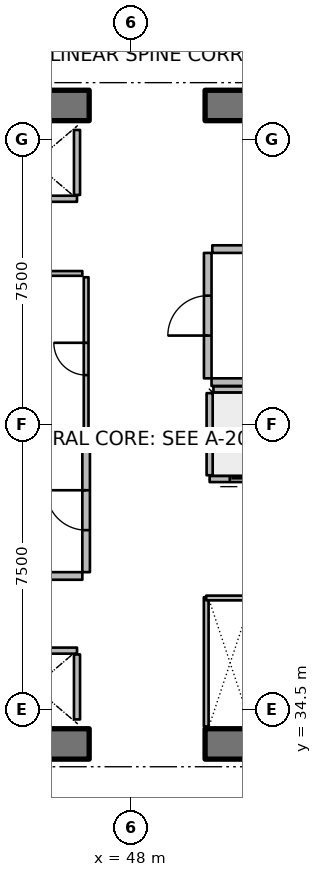
"""IFC4 building model, lengths in metres.
Left out: names, types, materials, properties, quantities, classifications, styles, units other than length and angle.
Written with IfcOpenShell. Run it as: python <this file> out.ifc"""

import sys

from ifc_helpers import new_model, si_unit, direction, frame, frame_2d, origin, place, context, subcontext, project, spatial, rectangle, extrude, element, fill, save


model = new_model("IFC4")
c1 = context("Model", 3, precision=1e-05, world=origin(), true_north=direction((0.0, 1.0)))
c2 = subcontext(c1, "Body", "Model", "MODEL_VIEW")
j1 = project(units=[si_unit("LENGTHUNIT", "METRE"), si_unit("PLANEANGLEUNIT", "RADIAN")], contexts=[c1])
p1 = place(None, origin())
s1 = spatial("IfcSite", under=j1, at=p1, CompositionType="ELEMENT")
p2 = place(p1, origin())
s2 = spatial("IfcBuilding", under=s1, at=p2, CompositionType="ELEMENT")
p3 = place(p2, frame((0.0, 0.0, 127.8)))
s3 = spatial("IfcBuildingStorey", under=s2, at=p3, CompositionType="ELEMENT", Elevation=127.8)
p4 = place(p3, frame((37.0, 33.6, 0.0), z_axis=(0.0, 0.0, 1.0), x_axis=(1.0, 0.0, 0.0)))
e1 = element("IfcWall", 1, at=p4, inside=s3, PredefinedType="SHEAR", context=c2, shape_type="SweptSolid", body=[
    extrude(rectangle(XDim=9.9, YDim=0.8, at=frame_2d((4.95, 0.0))), origin(), (0.0, 0.0, 1.0), 3.75),
])
p5 = place(p3, frame((49.95, 33.6, 0.0), z_axis=(0.0, 0.0, 1.0), x_axis=(1.0, 0.0, 0.0)))
e2 = element("IfcWall", 2, at=p5, inside=s3, PredefinedType="SHEAR", context=c2, shape_type="SweptSolid", body=[
    extrude(rectangle(XDim=9.9, YDim=0.8, at=frame_2d((4.95, 0.0))), origin(), (0.0, 0.0, 1.0), 3.75),
])
p6 = place(p3, frame((37.0, 50.4, 0.0), z_axis=(0.0, 0.0, 1.0), x_axis=(1.0, 0.0, 0.0)))
e3 = element("IfcWall", 3, at=p6, inside=s3, PredefinedType="SHEAR", context=c2, shape_type="SweptSolid", body=[
    extrude(rectangle(XDim=9.9, YDim=0.8, at=frame_2d((4.95, 0.0))), origin(), (0.0, 0.0, 1.0), 3.75),
])
p7 = place(p3, frame((49.95, 50.4, 0.0), z_axis=(0.0, 0.0, 1.0), x_axis=(1.0, 0.0, 0.0)))
e4 = element("IfcWall", 4, at=p7, inside=s3, PredefinedType="SHEAR", context=c2, shape_type="SweptSolid", body=[
    extrude(rectangle(XDim=9.9, YDim=0.8, at=frame_2d((4.95, 0.0))), origin(), (0.0, 0.0, 1.0), 3.75),
])
p8 = place(p3, frame((46.58, 47.945, 0.0), z_axis=(0.0, 0.0, 1.0), x_axis=(-1.0, 0.0, 0.0)))
e5 = element("IfcWall", 5, at=p8, inside=s3, PredefinedType="PARTITIONING", context=c2, shape_type="SweptSolid", body=[
    extrude(rectangle(XDim=2.26, YDim=0.16, at=frame_2d((1.13, 0.0))), origin(), (0.0, 0.0, 1.0), 3.5),
])
p9 = place(p3, frame((46.58, 48.045, 0.0), z_axis=(0.0, 0.0, 1.0), x_axis=(0.0, 1.0, 0.0)))
e6 = element("IfcWall", 6, at=p9, inside=s3, PredefinedType="PARTITIONING", context=c2, shape_type="SweptSolid", body=[
    extrude(rectangle(XDim=1.71, YDim=0.16, at=frame_2d((0.855, 0.0))), origin(), (0.0, 0.0, 1.0), 3.5),
])
p10 = place(p3, frame((44.32, 36.055, 0.0), z_axis=(0.0, 0.0, 1.0), x_axis=(1.0, 0.0, 0.0)))
e7 = element("IfcWall", 7, at=p10, inside=s3, PredefinedType="PARTITIONING", context=c2, shape_type="SweptSolid", body=[
    extrude(rectangle(XDim=2.26, YDim=0.16, at=frame_2d((1.13, 0.0))), origin(), (0.0, 0.0, 1.0), 3.5),
])
p11 = place(p3, frame((46.58, 34.245, 0.0), z_axis=(0.0, 0.0, 1.0), x_axis=(0.0, 1.0, 0.0)))
e8 = element("IfcWall", 8, at=p11, inside=s3, PredefinedType="PARTITIONING", context=c2, shape_type="SweptSolid", body=[
    extrude(rectangle(XDim=1.71, YDim=0.16, at=frame_2d((0.855, 0.0))), origin(), (0.0, 0.0, 1.0), 3.5),
])
p12 = place(p3, frame((52.23, 40.57, 0.0), z_axis=(0.0, 0.0, 1.0), x_axis=(-1.0, 0.0, 0.0)))
e9 = element("IfcWall", 9, at=p12, inside=s3, PredefinedType="PARTITIONING", context=c2, shape_type="SweptSolid", body=[
    extrude(rectangle(XDim=2.16, YDim=0.16, at=frame_2d((1.08, 0.0))), origin(), (0.0, 0.0, 1.0), 3.5),
])
p13 = place(p12, frame((0.53, 0.0, 0.0)))
e10 = element("IfcOpeningElement", 10, at=p13, cuts=e9, PredefinedType="OPENING", context=c2, shape_type="SweptSolid", body=[
    extrude(rectangle(XDim=1.1, YDim=2.1, at=frame_2d((0.55, 1.05))), frame((0.0, 0.09, 0.0), z_axis=(0.0, -1.0, 0.0), x_axis=(1.0, 0.0, 0.0)), (0.0, 0.0, 1.0), 0.18),
])
p14 = place(p3, frame((50.07, 40.67, 0.0), z_axis=(0.0, 0.0, 1.0), x_axis=(0.0, 1.0, 0.0)))
e11 = element("IfcWall", 11, at=p14, inside=s3, PredefinedType="PARTITIONING", context=c2, shape_type="SweptSolid", body=[
    extrude(rectangle(XDim=2.16, YDim=0.16, at=frame_2d((1.08, 0.0))), origin(), (0.0, 0.0, 1.0), 3.5),
])
p15 = place(p3, frame((50.17, 42.93, 0.0), z_axis=(0.0, 0.0, 1.0), x_axis=(1.0, 0.0, 0.0)))
e12 = element("IfcWall", 12, at=p15, inside=s3, PredefinedType="PARTITIONING", context=c2, shape_type="SweptSolid", body=[
    extrude(rectangle(XDim=1.96, YDim=0.16, at=frame_2d((0.98, 0.0))), origin(), (0.0, 0.0, 1.0), 3.5),
])
p16 = place(p3, frame((41.35, 38.02, 0.0), z_axis=(0.0, 0.0, 1.0), x_axis=(1.0, 0.0, 0.0)))
e13 = element("IfcWall", 13, at=p16, inside=s3, PredefinedType="PARTITIONING", context=c2, shape_type="SweptSolid", body=[
    extrude(rectangle(XDim=5.37, YDim=0.2, at=frame_2d((2.685, 0.0))), origin(), (0.0, 0.0, 1.0), 3.5),
])
p17 = place(p3, frame((43.92, 41.48, 0.0), z_axis=(0.0, 0.0, 1.0), x_axis=(1.0, 0.0, 0.0)))
e14 = element("IfcWall", 14, at=p17, inside=s3, PredefinedType="PARTITIONING", context=c2, shape_type="SweptSolid", body=[
    extrude(rectangle(XDim=2.8, YDim=0.2, at=frame_2d((1.4, 0.0))), origin(), (0.0, 0.0, 1.0), 3.5),
])
p18 = place(p3, frame((46.82, 38.12, 0.0), z_axis=(0.0, 0.0, 1.0), x_axis=(0.0, 1.0, 0.0)))
e15 = element("IfcWall", 15, at=p18, inside=s3, PredefinedType="PARTITIONING", context=c2, shape_type="SweptSolid", body=[
    extrude(rectangle(XDim=3.26, YDim=0.2, at=frame_2d((1.63, 0.0))), origin(), (0.0, 0.0, 1.0), 3.5),
])
p19 = place(p18, frame((1.105, 0.0, 0.0)))
e16 = element("IfcOpeningElement", 16, at=p19, cuts=e15, PredefinedType="OPENING", context=c2, shape_type="SweptSolid", body=[
    extrude(rectangle(XDim=1.05, YDim=2.1, at=frame_2d((0.525, 1.05))), frame((0.0, 0.11, 0.0), z_axis=(0.0, -1.0, 0.0), x_axis=(1.0, 0.0, 0.0)), (0.0, 0.0, 1.0), 0.22),
])
p20 = place(p3, frame((50.12, 43.12, 0.0), z_axis=(0.0, 0.0, 1.0), x_axis=(1.0, 0.0, 0.0)))
e17 = element("IfcWall", 17, at=p20, inside=s3, PredefinedType="PARTITIONING", context=c2, shape_type="SweptSolid", body=[
    extrude(rectangle(XDim=8.88, YDim=0.2, at=frame_2d((4.44, 0.0))), origin(), (0.0, 0.0, 1.0), 3.5),
])
p21 = place(p3, frame((50.14, 46.62, 0.0), z_axis=(0.0, 0.0, 1.0), x_axis=(1.0, 0.0, 0.0)))
e18 = element("IfcWall", 18, at=p21, inside=s3, PredefinedType="PARTITIONING", context=c2, shape_type="SweptSolid", body=[
    extrude(rectangle(XDim=1.02, YDim=0.2, at=frame_2d((0.51, 0.0))), origin(), (0.0, 0.0, 1.0), 3.5),
])
p22 = place(p3, frame((50.02, 43.22, 0.0), z_axis=(0.0, 0.0, 1.0), x_axis=(0.0, 1.0, 0.0)))
e19 = element("IfcWall", 19, at=p22, inside=s3, PredefinedType="PARTITIONING", context=c2, shape_type="SweptSolid", body=[
    extrude(rectangle(XDim=3.3, YDim=0.2, at=frame_2d((1.65, 0.0))), origin(), (0.0, 0.0, 1.0), 3.5),
])
p23 = place(p22, frame((1.125, 0.0, 0.0)))
e20 = element("IfcOpeningElement", 20, at=p23, cuts=e19, PredefinedType="OPENING", context=c2, shape_type="SweptSolid", body=[
    extrude(rectangle(XDim=1.05, YDim=2.1, at=frame_2d((0.525, 1.05))), frame((0.0, 0.11, 0.0), z_axis=(0.0, -1.0, 0.0), x_axis=(1.0, 0.0, 0.0)), (0.0, 0.0, 1.0), 0.22),
])
p24 = place(p3, frame((41.36, 45.98, 0.0), z_axis=(0.0, 0.0, 1.0), x_axis=(1.0, 0.0, 0.0)))
e21 = element("IfcWall", 21, at=p24, inside=s3, PredefinedType="PARTITIONING", context=c2, shape_type="SweptSolid", body=[
    extrude(rectangle(XDim=5.36, YDim=0.125, at=frame_2d((2.68, 0.0))), origin(), (0.0, 0.0, 1.0), 2.94),
])
p25 = place(p3, frame((49.98, 34.06, 0.0), z_axis=(0.0, 0.0, 1.0), x_axis=(0.0, 1.0, 0.0)))
e22 = element("IfcWall", 22, at=p25, inside=s3, PredefinedType="PARTITIONING", context=c2, shape_type="SweptSolid", body=[
    extrude(rectangle(XDim=3.4, YDim=0.125, at=frame_2d((1.7, 0.0))), origin(), (0.0, 0.0, 1.0), 2.94),
])
p26 = place(p3, frame((49.98, 37.44, 0.0), z_axis=(0.0, 0.0, 1.0), x_axis=(1.0, 0.0, 0.0)))
e23 = element("IfcWall", 23, at=p26, inside=s3, PredefinedType="PARTITIONING", context=c2, shape_type="SweptSolid", body=[
    extrude(rectangle(XDim=1.26, YDim=0.125, at=frame_2d((0.63, 0.0))), origin(), (0.0, 0.0, 1.0), 2.94),
])
p27 = place(p3, frame((46.82, 41.58, 0.0), z_axis=(0.0, 0.0, 1.0), x_axis=(0.0, 1.0, 0.0)))
e24 = element("IfcWall", 24, at=p27, inside=s3, PredefinedType="PARTITIONING", context=c2, shape_type="SweptSolid", body=[
    extrude(rectangle(XDim=4.3, YDim=0.125, at=frame_2d((2.15, 0.0))), origin(), (0.0, 0.0, 1.0), 2.94),
])
p28 = place(p27, frame((1.725, 0.0, 0.0)))
e25 = element("IfcOpeningElement", 25, at=p28, cuts=e24, PredefinedType="OPENING", context=c2, shape_type="SweptSolid", body=[
    extrude(rectangle(XDim=0.85, YDim=2.06, at=frame_2d((0.425, 1.03))), frame((0.0, 0.073, 0.0), z_axis=(0.0, -1.0, 0.0), x_axis=(1.0, 0.0, 0.0)), (0.0, 0.0, 1.0), 0.145),
])
p29 = place(p13, origin())
e26 = element("IfcDoor", 26, at=p29, inside=s3, OperationType="DOUBLE_DOOR_SLIDING", PredefinedType="DOOR", context=c2, shape_type="SweptSolid", body=[
    extrude(rectangle(XDim=1.1, YDim=2.1, at=frame_2d((0.55, 1.05))), frame((0.0, 0.025, 0.0), z_axis=(0.0, -1.0, 0.0), x_axis=(1.0, 0.0, 0.0)), (0.0, 0.0, 1.0), 0.05),
])
fill(e10, e26)
p30 = place(p19, origin())
e27 = element("IfcDoor", 27, at=p30, inside=s3, OperationType="SINGLE_SWING_RIGHT", PredefinedType="DOOR", context=c2, shape_type="SweptSolid", body=[
    extrude(rectangle(XDim=1.05, YDim=2.1, at=frame_2d((0.525, 1.05))), frame((0.0, 0.025, 0.0), z_axis=(0.0, -1.0, 0.0), x_axis=(1.0, 0.0, 0.0)), (0.0, 0.0, 1.0), 0.05),
])
fill(e16, e27)
p31 = place(p23, origin())
e28 = element("IfcDoor", 28, at=p31, inside=s3, OperationType="SINGLE_SWING_LEFT", PredefinedType="DOOR", context=c2, shape_type="SweptSolid", body=[
    extrude(rectangle(XDim=1.05, YDim=2.1, at=frame_2d((0.525, 1.05))), frame((0.0, 0.025, 0.0), z_axis=(0.0, -1.0, 0.0), x_axis=(1.0, 0.0, 0.0)), (0.0, 0.0, 1.0), 0.05),
])
fill(e20, e28)
p32 = place(p28, origin())
e29 = element("IfcDoor", 29, at=p32, inside=s3, OperationType="SINGLE_SWING_RIGHT", PredefinedType="DOOR", context=c2, shape_type="SweptSolid", body=[
    extrude(rectangle(XDim=0.85, YDim=2.06, at=frame_2d((0.425, 1.03))), frame((0.0, 0.025, 0.0), z_axis=(0.0, -1.0, 0.0), x_axis=(1.0, 0.0, 0.0)), (0.0, 0.0, 1.0), 0.05),
])
fill(e25, e29)
save(model, sys.argv[1])
